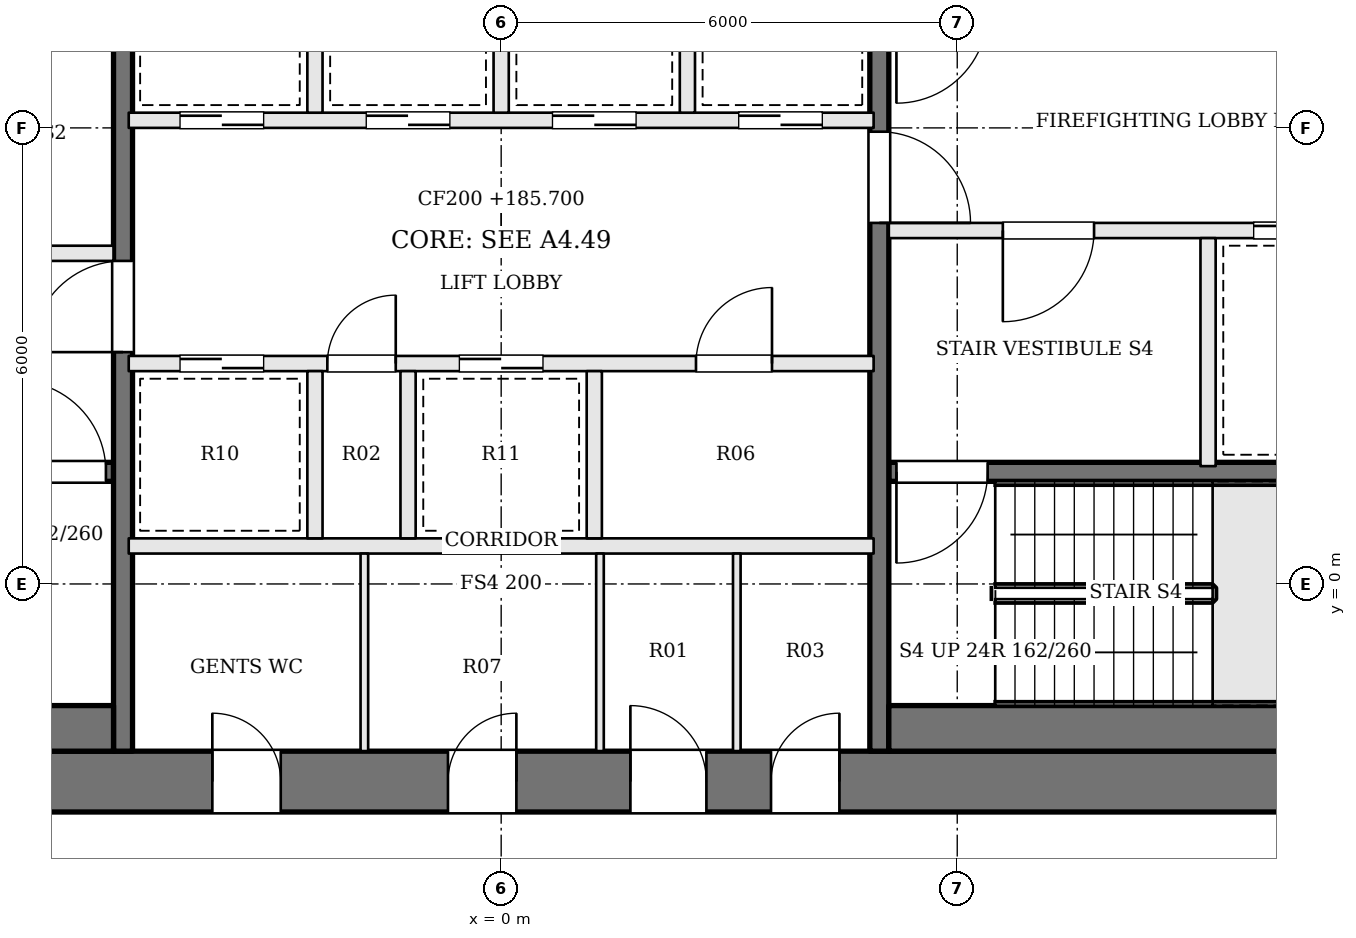
"""IFC4 building model, lengths in metres.
Left out: names, types, materials, properties, quantities, classifications, styles, units other than length and angle.
Written with IfcOpenShell. Run it as: python <this file> out.ifc"""

import sys

from ifc_helpers import new_model, si_unit, direction, frame, frame_2d, origin, place, context, subcontext, project, spatial, rectangle, extrude, element, fill, save


model = new_model("IFC4")
c1 = context("Model", 3, precision=1e-05, world=origin(), true_north=direction((0.0, 1.0)))
c2 = subcontext(c1, "Body", "Model", "MODEL_VIEW")
j1 = project(units=[si_unit("LENGTHUNIT", "METRE"), si_unit("PLANEANGLEUNIT", "RADIAN")], contexts=[c1])
p1 = place(None, origin())
s1 = spatial("IfcSite", under=j1, at=p1, CompositionType="ELEMENT")
p2 = place(p1, origin())
s2 = spatial("IfcBuilding", under=s1, at=p2, CompositionType="ELEMENT")
p3 = place(p2, frame((0.0, 0.0, 185.7)))
s3 = spatial("IfcBuildingStorey", under=s2, at=p3, CompositionType="ELEMENT", Elevation=185.7)
p4 = place(p3, frame((-13.0, -2.6, 0.0), z_axis=(0.0, 0.0, 1.0), x_axis=(1.0, 0.0, 0.0)))
e1 = element("IfcWall", 1, at=p4, inside=s3, PredefinedType="SHEAR", context=c2, shape_type="SweptSolid", body=[
    extrude(rectangle(XDim=26.0, YDim=0.8, at=frame_2d((13.0, 0.0))), origin(), (0.0, 0.0, 1.0), 3.9),
])
p5 = place(p4, frame((9.2, 0.0, 0.0)))
e2 = element("IfcOpeningElement", 2, at=p5, cuts=e1, PredefinedType="OPENING", context=c2, shape_type="SweptSolid", body=[
    extrude(rectangle(XDim=0.9, YDim=2.1, at=frame_2d((0.45, 1.05))), frame((0.0, 0.41, 0.0), z_axis=(0.0, -1.0, 0.0), x_axis=(1.0, 0.0, 0.0)), (0.0, 0.0, 1.0), 0.82),
])
p6 = place(p4, frame((12.3, 0.0, 0.0)))
e3 = element("IfcOpeningElement", 3, at=p6, cuts=e1, PredefinedType="OPENING", context=c2, shape_type="SweptSolid", body=[
    extrude(rectangle(XDim=0.9, YDim=2.1, at=frame_2d((0.45, 1.05))), frame((0.0, 0.41, 0.0), z_axis=(0.0, -1.0, 0.0), x_axis=(1.0, 0.0, 0.0)), (0.0, 0.0, 1.0), 0.82),
])
p7 = place(p4, frame((14.7, 0.0, 0.0)))
e4 = element("IfcOpeningElement", 4, at=p7, cuts=e1, PredefinedType="OPENING", context=c2, shape_type="SweptSolid", body=[
    extrude(rectangle(XDim=1.0, YDim=2.1, at=frame_2d((0.5, 1.05))), frame((0.0, 0.41, 0.0), z_axis=(0.0, -1.0, 0.0), x_axis=(1.0, 0.0, 0.0)), (0.0, 0.0, 1.0), 0.82),
])
p8 = place(p4, frame((16.55, 0.0, 0.0)))
e5 = element("IfcOpeningElement", 5, at=p8, cuts=e1, PredefinedType="OPENING", context=c2, shape_type="SweptSolid", body=[
    extrude(rectangle(XDim=0.9, YDim=2.1, at=frame_2d((0.45, 1.05))), frame((0.0, 0.41, 0.0), z_axis=(0.0, -1.0, 0.0), x_axis=(1.0, 0.0, 0.0)), (0.0, 0.0, 1.0), 0.82),
])
p9 = place(p3, frame((-12.2, 1.475, 0.0), z_axis=(0.0, 0.0, 1.0), x_axis=(1.0, 0.0, 0.0)))
e6 = element("IfcWall", 6, at=p9, inside=s3, PredefinedType="SOLIDWALL", context=c2, shape_type="SweptSolid", body=[
    extrude(rectangle(XDim=7.1, YDim=0.25, at=frame_2d((3.55, 0.0))), origin(), (0.0, 0.0, 1.0), 3.7),
])
p10 = place(p9, frame((5.8, 0.0, 0.0)))
e7 = element("IfcOpeningElement", 7, at=p10, cuts=e6, PredefinedType="OPENING", context=c2, shape_type="SweptSolid", body=[
    extrude(rectangle(XDim=1.2, YDim=2.1, at=frame_2d((0.6, 1.05))), frame((0.0, 0.135, 0.0), z_axis=(0.0, -1.0, 0.0), x_axis=(1.0, 0.0, 0.0)), (0.0, 0.0, 1.0), 0.27),
])
p11 = place(p3, frame((-12.2, 4.35, 0.0), z_axis=(0.0, 0.0, 1.0), x_axis=(1.0, 0.0, 0.0)))
e8 = element("IfcWall", 8, at=p11, inside=s3, PredefinedType="SOLIDWALL", context=c2, shape_type="SweptSolid", body=[
    extrude(rectangle(XDim=7.1, YDim=0.2, at=frame_2d((3.55, 0.0))), origin(), (0.0, 0.0, 1.0), 3.7),
])
p12 = place(p11, frame((4.4, 0.0, 0.0)))
e9 = element("IfcOpeningElement", 9, at=p12, cuts=e8, PredefinedType="OPENING", context=c2, shape_type="SweptSolid", body=[
    extrude(rectangle(XDim=1.2, YDim=2.1, at=frame_2d((0.6, 1.05))), frame((0.0, 0.11, 0.0), z_axis=(0.0, -1.0, 0.0), x_axis=(1.0, 0.0, 0.0)), (0.0, 0.0, 1.0), 0.22),
])
p13 = place(p11, frame((1.1, 0.0, 0.0)))
e10 = element("IfcOpeningElement", 10, at=p13, cuts=e8, PredefinedType="OPENING", context=c2, shape_type="SweptSolid", body=[
    extrude(rectangle(XDim=1.2, YDim=2.1, at=frame_2d((0.6, 1.05))), frame((0.0, 0.11, 0.0), z_axis=(0.0, -1.0, 0.0), x_axis=(1.0, 0.0, 0.0)), (0.0, 0.0, 1.0), 0.22),
])
p14 = place(p3, frame((12.2, 4.65, 0.0), z_axis=(0.0, 0.0, 1.0), x_axis=(-1.0, 0.0, 0.0)))
e11 = element("IfcWall", 11, at=p14, inside=s3, PredefinedType="SOLIDWALL", context=c2, shape_type="SweptSolid", body=[
    extrude(rectangle(XDim=7.1, YDim=0.2, at=frame_2d((3.55, 0.0))), origin(), (0.0, 0.0, 1.0), 3.7),
])
p15 = place(p14, frame((4.4, 0.0, 0.0)))
e12 = element("IfcOpeningElement", 12, at=p15, cuts=e11, PredefinedType="OPENING", context=c2, shape_type="SweptSolid", body=[
    extrude(rectangle(XDim=1.2, YDim=2.1, at=frame_2d((0.6, 1.05))), frame((0.0, 0.11, 0.0), z_axis=(0.0, -1.0, 0.0), x_axis=(1.0, 0.0, 0.0)), (0.0, 0.0, 1.0), 0.22),
])
p16 = place(p14, frame((1.1, 0.0, 0.0)))
e13 = element("IfcOpeningElement", 13, at=p16, cuts=e11, PredefinedType="OPENING", context=c2, shape_type="SweptSolid", body=[
    extrude(rectangle(XDim=1.2, YDim=2.1, at=frame_2d((0.6, 1.05))), frame((0.0, 0.11, 0.0), z_axis=(0.0, -1.0, 0.0), x_axis=(1.0, 0.0, 0.0)), (0.0, 0.0, 1.0), 0.22),
])
p17 = place(p3, frame((12.2, 1.475, 0.0), z_axis=(0.0, 0.0, 1.0), x_axis=(-1.0, 0.0, 0.0)))
e14 = element("IfcWall", 14, at=p17, inside=s3, PredefinedType="SOLIDWALL", context=c2, shape_type="SweptSolid", body=[
    extrude(rectangle(XDim=7.1, YDim=0.25, at=frame_2d((3.55, 0.0))), origin(), (0.0, 0.0, 1.0), 3.7),
])
p18 = place(p17, frame((5.8, 0.0, 0.0)))
e15 = element("IfcOpeningElement", 15, at=p18, cuts=e14, PredefinedType="OPENING", context=c2, shape_type="SweptSolid", body=[
    extrude(rectangle(XDim=1.2, YDim=2.1, at=frame_2d((0.6, 1.05))), frame((0.0, 0.135, 0.0), z_axis=(0.0, -1.0, 0.0), x_axis=(1.0, 0.0, 0.0)), (0.0, 0.0, 1.0), 0.27),
])
p19 = place(p3, frame((9.3, 4.55, 0.0), z_axis=(0.0, 0.0, 1.0), x_axis=(0.0, -1.0, 0.0)))
e16 = element("IfcWall", 16, at=p19, inside=s3, PredefinedType="SOLIDWALL", context=c2, shape_type="SweptSolid", body=[
    extrude(rectangle(XDim=3.0, YDim=0.2, at=frame_2d((1.5, 0.0))), origin(), (0.0, 0.0, 1.0), 3.7),
])
p20 = place(p3, frame((-4.975, -2.2, 0.0), z_axis=(0.0, 0.0, 1.0), x_axis=(0.0, 1.0, 0.0)))
e17 = element("IfcWall", 17, at=p20, inside=s3, PredefinedType="SOLIDWALL", context=c2, shape_type="SweptSolid", body=[
    extrude(rectangle(XDim=13.4, YDim=0.25, at=frame_2d((6.7, 0.0))), origin(), (0.0, 0.0, 1.0), 3.7),
])
p21 = place(p20, frame((5.25, 0.0, 0.0)))
e18 = element("IfcOpeningElement", 18, at=p21, cuts=e17, PredefinedType="OPENING", context=c2, shape_type="SweptSolid", body=[
    extrude(rectangle(XDim=1.2, YDim=2.1, at=frame_2d((0.6, 1.05))), frame((0.0, 0.135, 0.0), z_axis=(0.0, -1.0, 0.0), x_axis=(1.0, 0.0, 0.0)), (0.0, 0.0, 1.0), 0.27),
])
p22 = place(p3, frame((4.975, 11.2, 0.0), z_axis=(0.0, 0.0, 1.0), x_axis=(0.0, -1.0, 0.0)))
e19 = element("IfcWall", 19, at=p22, inside=s3, PredefinedType="SOLIDWALL", context=c2, shape_type="SweptSolid", body=[
    extrude(rectangle(XDim=13.4, YDim=0.25, at=frame_2d((6.7, 0.0))), origin(), (0.0, 0.0, 1.0), 3.7),
])
p23 = place(p22, frame((5.25, 0.0, 0.0)))
e20 = element("IfcOpeningElement", 20, at=p23, cuts=e19, PredefinedType="OPENING", context=c2, shape_type="SweptSolid", body=[
    extrude(rectangle(XDim=1.2, YDim=2.1, at=frame_2d((0.6, 1.05))), frame((0.0, 0.135, 0.0), z_axis=(0.0, -1.0, 0.0), x_axis=(1.0, 0.0, 0.0)), (0.0, 0.0, 1.0), 0.27),
])
for number, where, z_axis, x_axis in (
    (21, (-12.2, -1.9, 0.0), (0.0, 0.0, 1.0), (1.0, 0.0, 0.0)),
    (22, (12.2, -1.9, 0.0), (0.0, 0.0, 1.0), (-1.0, 0.0, 0.0)),
):
    element("IfcWall", number, at=place(p3, frame(where, z_axis=z_axis, x_axis=x_axis)), inside=s3, PredefinedType="SOLIDWALL", context=c2, shape_type="SweptSolid", body=[
        extrude(rectangle(XDim=7.1, YDim=0.6, at=frame_2d((3.55, 0.0))), origin(), (0.0, 0.0, 1.0), 3.7),
    ])
p24 = place(p3, frame((-4.9, 0.5, 0.0), z_axis=(0.0, 0.0, 1.0), x_axis=(1.0, 0.0, 0.0)))
e23 = element("IfcWall", 23, at=p24, inside=s3, PredefinedType="SOLIDWALL", context=c2, shape_type="SweptSolid", body=[
    extrude(rectangle(XDim=9.8, YDim=0.2, at=frame_2d((4.9, 0.0))), origin(), (0.0, 0.0, 1.0), 3.7),
])
p25 = place(p3, frame((-4.9, 2.9, 0.0), z_axis=(0.0, 0.0, 1.0), x_axis=(1.0, 0.0, 0.0)))
e24 = element("IfcWall", 24, at=p25, inside=s3, PredefinedType="SOLIDWALL", context=c2, shape_type="SweptSolid", body=[
    extrude(rectangle(XDim=9.8, YDim=0.2, at=frame_2d((4.9, 0.0))), origin(), (0.0, 0.0, 1.0), 3.7),
])
p26 = place(p25, frame((0.675, 0.0, 0.0)))
e25 = element("IfcOpeningElement", 25, at=p26, cuts=e24, PredefinedType="OPENING", context=c2, shape_type="SweptSolid", body=[
    extrude(rectangle(XDim=1.1, YDim=2.1, at=frame_2d((0.55, 1.05))), frame((0.0, 0.11, 0.0), z_axis=(0.0, -1.0, 0.0), x_axis=(1.0, 0.0, 0.0)), (0.0, 0.0, 1.0), 0.22),
])
p27 = place(p25, frame((2.613, 0.0, 0.0)))
e26 = element("IfcOpeningElement", 26, at=p27, cuts=e24, PredefinedType="OPENING", context=c2, shape_type="SweptSolid", body=[
    extrude(rectangle(XDim=0.9, YDim=2.1, at=frame_2d((0.45, 1.05))), frame((0.0, 0.11, 0.0), z_axis=(0.0, -1.0, 0.0), x_axis=(1.0, 0.0, 0.0)), (0.0, 0.0, 1.0), 0.22),
])
p28 = place(p25, frame((4.35, 0.0, 0.0)))
e27 = element("IfcOpeningElement", 27, at=p28, cuts=e24, PredefinedType="OPENING", context=c2, shape_type="SweptSolid", body=[
    extrude(rectangle(XDim=1.1, YDim=2.1, at=frame_2d((0.55, 1.05))), frame((0.0, 0.11, 0.0), z_axis=(0.0, -1.0, 0.0), x_axis=(1.0, 0.0, 0.0)), (0.0, 0.0, 1.0), 0.22),
])
p29 = place(p25, frame((7.463, 0.0, 0.0)))
e28 = element("IfcOpeningElement", 28, at=p29, cuts=e24, PredefinedType="OPENING", context=c2, shape_type="SweptSolid", body=[
    extrude(rectangle(XDim=1.0, YDim=2.1, at=frame_2d((0.5, 1.05))), frame((0.0, 0.11, 0.0), z_axis=(0.0, -1.0, 0.0), x_axis=(1.0, 0.0, 0.0)), (0.0, 0.0, 1.0), 0.22),
])
p30 = place(p3, frame((-4.9, 6.1, 0.0), z_axis=(0.0, 0.0, 1.0), x_axis=(1.0, 0.0, 0.0)))
e29 = element("IfcWall", 29, at=p30, inside=s3, PredefinedType="SOLIDWALL", context=c2, shape_type="SweptSolid", body=[
    extrude(rectangle(XDim=9.8, YDim=0.2, at=frame_2d((4.9, 0.0))), origin(), (0.0, 0.0, 1.0), 3.7),
])
p31 = place(p30, frame((0.675, 0.0, 0.0)))
e30 = element("IfcOpeningElement", 30, at=p31, cuts=e29, PredefinedType="OPENING", context=c2, shape_type="SweptSolid", body=[
    extrude(rectangle(XDim=1.1, YDim=2.1, at=frame_2d((0.55, 1.05))), frame((0.0, 0.11, 0.0), z_axis=(0.0, -1.0, 0.0), x_axis=(1.0, 0.0, 0.0)), (0.0, 0.0, 1.0), 0.22),
])
p32 = place(p30, frame((3.125, 0.0, 0.0)))
e31 = element("IfcOpeningElement", 31, at=p32, cuts=e29, PredefinedType="OPENING", context=c2, shape_type="SweptSolid", body=[
    extrude(rectangle(XDim=1.1, YDim=2.1, at=frame_2d((0.55, 1.05))), frame((0.0, 0.11, 0.0), z_axis=(0.0, -1.0, 0.0), x_axis=(1.0, 0.0, 0.0)), (0.0, 0.0, 1.0), 0.22),
])
p33 = place(p30, frame((5.575, 0.0, 0.0)))
e32 = element("IfcOpeningElement", 32, at=p33, cuts=e29, PredefinedType="OPENING", context=c2, shape_type="SweptSolid", body=[
    extrude(rectangle(XDim=1.1, YDim=2.1, at=frame_2d((0.55, 1.05))), frame((0.0, 0.11, 0.0), z_axis=(0.0, -1.0, 0.0), x_axis=(1.0, 0.0, 0.0)), (0.0, 0.0, 1.0), 0.22),
])
p34 = place(p30, frame((8.025, 0.0, 0.0)))
e33 = element("IfcOpeningElement", 33, at=p34, cuts=e29, PredefinedType="OPENING", context=c2, shape_type="SweptSolid", body=[
    extrude(rectangle(XDim=1.1, YDim=2.1, at=frame_2d((0.55, 1.05))), frame((0.0, 0.11, 0.0), z_axis=(0.0, -1.0, 0.0), x_axis=(1.0, 0.0, 0.0)), (0.0, 0.0, 1.0), 0.22),
])
for number, where, z_axis, x_axis in (
    (34, (-2.45, 0.6, 0.0), (0.0, 0.0, 1.0), (0.0, 1.0, 0.0)),
    (35, (-1.225, 0.6, 0.0), (0.0, 0.0, 1.0), (0.0, 1.0, 0.0)),
    (36, (1.225, 0.6, 0.0), (0.0, 0.0, 1.0), (0.0, 1.0, 0.0)),
    (37, (-2.45, 6.2, 0.0), (0.0, 0.0, 1.0), (0.0, 1.0, 0.0)),
    (38, (0.0, 6.2, 0.0), (0.0, 0.0, 1.0), (0.0, 1.0, 0.0)),
    (39, (2.45, 6.2, 0.0), (0.0, 0.0, 1.0), (0.0, 1.0, 0.0)),
):
    element("IfcWall", number, at=place(p3, frame(where, z_axis=z_axis, x_axis=x_axis)), inside=s3, PredefinedType="SOLIDWALL", context=c2, shape_type="SweptSolid", body=[
        extrude(rectangle(XDim=2.2, YDim=0.2, at=frame_2d((1.1, 0.0))), origin(), (0.0, 0.0, 1.0), 3.7),
    ])
for number, where, z_axis, x_axis in (
    (40, (-1.8, -2.2, 0.0), (0.0, 0.0, 1.0), (0.0, 1.0, 0.0)),
    (41, (1.3, -2.2, 0.0), (0.0, 0.0, 1.0), (0.0, 1.0, 0.0)),
    (42, (3.1, -2.2, 0.0), (0.0, 0.0, 1.0), (0.0, 1.0, 0.0)),
):
    element("IfcWall", number, at=place(p3, frame(where, z_axis=z_axis, x_axis=x_axis)), inside=s3, PredefinedType="PARTITIONING", context=c2, shape_type="SweptSolid", body=[
        extrude(rectangle(XDim=2.6, YDim=0.1, at=frame_2d((1.3, 0.0))), origin(), (0.0, 0.0, 1.0), 3.7),
    ])
p35 = place(p21, origin())
e43 = element("IfcDoor", 43, at=p35, inside=s3, OperationType="SINGLE_SWING_LEFT", PredefinedType="DOOR", context=c2, shape_type="SweptSolid", body=[
    extrude(rectangle(XDim=1.2, YDim=2.1, at=frame_2d((0.6, 1.05))), frame((0.0, 0.025, 0.0), z_axis=(0.0, -1.0, 0.0), x_axis=(1.0, 0.0, 0.0)), (0.0, 0.0, 1.0), 0.05),
])
fill(e18, e43)
p36 = place(p23, origin())
e44 = element("IfcDoor", 44, at=p36, inside=s3, OperationType="SINGLE_SWING_RIGHT", PredefinedType="DOOR", context=c2, shape_type="SweptSolid", body=[
    extrude(rectangle(XDim=1.2, YDim=2.1, at=frame_2d((0.6, 1.05))), frame((0.0, 0.025, 0.0), z_axis=(0.0, -1.0, 0.0), x_axis=(1.0, 0.0, 0.0)), (0.0, 0.0, 1.0), 0.05),
])
fill(e20, e44)
p37 = place(p15, origin())
e45 = element("IfcDoor", 45, at=p37, inside=s3, OperationType="SINGLE_SWING_RIGHT", PredefinedType="DOOR", context=c2, shape_type="SweptSolid", body=[
    extrude(rectangle(XDim=1.2, YDim=2.1, at=frame_2d((0.6, 1.05))), frame((0.0, 0.025, 0.0), z_axis=(0.0, -1.0, 0.0), x_axis=(1.0, 0.0, 0.0)), (0.0, 0.0, 1.0), 0.05),
])
fill(e12, e45)
p38 = place(p10, origin())
e46 = element("IfcDoor", 46, at=p38, inside=s3, OperationType="SINGLE_SWING_LEFT", PredefinedType="DOOR", context=c2, shape_type="SweptSolid", body=[
    extrude(rectangle(XDim=1.2, YDim=2.1, at=frame_2d((0.6, 1.05))), frame((0.0, 0.025, 0.0), z_axis=(0.0, -1.0, 0.0), x_axis=(1.0, 0.0, 0.0)), (0.0, 0.0, 1.0), 0.05),
])
fill(e7, e46)
p39 = place(p18, origin())
e47 = element("IfcDoor", 47, at=p39, inside=s3, OperationType="SINGLE_SWING_RIGHT", PredefinedType="DOOR", context=c2, shape_type="SweptSolid", body=[
    extrude(rectangle(XDim=1.2, YDim=2.1, at=frame_2d((0.6, 1.05))), frame((0.0, 0.025, 0.0), z_axis=(0.0, -1.0, 0.0), x_axis=(1.0, 0.0, 0.0)), (0.0, 0.0, 1.0), 0.05),
])
fill(e15, e47)
p40 = place(p16, origin())
e48 = element("IfcDoor", 48, at=p40, inside=s3, OperationType="SLIDING_TO_RIGHT", PredefinedType="DOOR", context=c2, shape_type="SweptSolid", body=[
    extrude(rectangle(XDim=1.2, YDim=2.1, at=frame_2d((0.6, 1.05))), frame((0.0, 0.025, 0.0), z_axis=(0.0, -1.0, 0.0), x_axis=(1.0, 0.0, 0.0)), (0.0, 0.0, 1.0), 0.05),
])
fill(e13, e48)
p41 = place(p26, origin())
e49 = element("IfcDoor", 49, at=p41, inside=s3, OperationType="SLIDING_TO_RIGHT", PredefinedType="DOOR", context=c2, shape_type="SweptSolid", body=[
    extrude(rectangle(XDim=1.1, YDim=2.1, at=frame_2d((0.55, 1.05))), frame((0.0, 0.025, 0.0), z_axis=(0.0, -1.0, 0.0), x_axis=(1.0, 0.0, 0.0)), (0.0, 0.0, 1.0), 0.05),
])
fill(e25, e49)
p42 = place(p27, origin())
e50 = element("IfcDoor", 50, at=p42, inside=s3, OperationType="SINGLE_SWING_RIGHT", PredefinedType="DOOR", context=c2, shape_type="SweptSolid", body=[
    extrude(rectangle(XDim=0.9, YDim=2.1, at=frame_2d((0.45, 1.05))), frame((0.0, 0.025, 0.0), z_axis=(0.0, -1.0, 0.0), x_axis=(1.0, 0.0, 0.0)), (0.0, 0.0, 1.0), 0.05),
])
fill(e26, e50)
p43 = place(p28, origin())
e51 = element("IfcDoor", 51, at=p43, inside=s3, OperationType="SLIDING_TO_LEFT", PredefinedType="DOOR", context=c2, shape_type="SweptSolid", body=[
    extrude(rectangle(XDim=1.1, YDim=2.1, at=frame_2d((0.55, 1.05))), frame((0.0, 0.025, 0.0), z_axis=(0.0, -1.0, 0.0), x_axis=(1.0, 0.0, 0.0)), (0.0, 0.0, 1.0), 0.05),
])
fill(e27, e51)
p44 = place(p29, origin())
e52 = element("IfcDoor", 52, at=p44, inside=s3, OperationType="SINGLE_SWING_RIGHT", PredefinedType="DOOR", context=c2, shape_type="SweptSolid", body=[
    extrude(rectangle(XDim=1.0, YDim=2.1, at=frame_2d((0.5, 1.05))), frame((0.0, 0.025, 0.0), z_axis=(0.0, -1.0, 0.0), x_axis=(1.0, 0.0, 0.0)), (0.0, 0.0, 1.0), 0.05),
])
fill(e28, e52)
p45 = place(p31, origin())
e53 = element("IfcDoor", 53, at=p45, inside=s3, OperationType="SLIDING_TO_RIGHT", PredefinedType="DOOR", context=c2, shape_type="SweptSolid", body=[
    extrude(rectangle(XDim=1.1, YDim=2.1, at=frame_2d((0.55, 1.05))), frame((0.0, 0.025, 0.0), z_axis=(0.0, -1.0, 0.0), x_axis=(1.0, 0.0, 0.0)), (0.0, 0.0, 1.0), 0.05),
])
fill(e30, e53)
p46 = place(p32, origin())
e54 = element("IfcDoor", 54, at=p46, inside=s3, OperationType="SLIDING_TO_LEFT", PredefinedType="DOOR", context=c2, shape_type="SweptSolid", body=[
    extrude(rectangle(XDim=1.1, YDim=2.1, at=frame_2d((0.55, 1.05))), frame((0.0, 0.025, 0.0), z_axis=(0.0, -1.0, 0.0), x_axis=(1.0, 0.0, 0.0)), (0.0, 0.0, 1.0), 0.05),
])
fill(e31, e54)
p47 = place(p33, origin())
e55 = element("IfcDoor", 55, at=p47, inside=s3, OperationType="SLIDING_TO_RIGHT", PredefinedType="DOOR", context=c2, shape_type="SweptSolid", body=[
    extrude(rectangle(XDim=1.1, YDim=2.1, at=frame_2d((0.55, 1.05))), frame((0.0, 0.025, 0.0), z_axis=(0.0, -1.0, 0.0), x_axis=(1.0, 0.0, 0.0)), (0.0, 0.0, 1.0), 0.05),
])
fill(e32, e55)
p48 = place(p34, origin())
e56 = element("IfcDoor", 56, at=p48, inside=s3, OperationType="SLIDING_TO_LEFT", PredefinedType="DOOR", context=c2, shape_type="SweptSolid", body=[
    extrude(rectangle(XDim=1.1, YDim=2.1, at=frame_2d((0.55, 1.05))), frame((0.0, 0.025, 0.0), z_axis=(0.0, -1.0, 0.0), x_axis=(1.0, 0.0, 0.0)), (0.0, 0.0, 1.0), 0.05),
])
fill(e33, e56)
p49 = place(p5, origin())
e57 = element("IfcDoor", 57, at=p49, inside=s3, OperationType="SINGLE_SWING_LEFT", PredefinedType="DOOR", context=c2, shape_type="SweptSolid", body=[
    extrude(rectangle(XDim=0.9, YDim=2.1, at=frame_2d((0.45, 1.05))), frame((0.0, 0.025, 0.0), z_axis=(0.0, -1.0, 0.0), x_axis=(1.0, 0.0, 0.0)), (0.0, 0.0, 1.0), 0.05),
])
fill(e2, e57)
p50 = place(p6, origin())
e58 = element("IfcDoor", 58, at=p50, inside=s3, OperationType="SINGLE_SWING_RIGHT", PredefinedType="DOOR", context=c2, shape_type="SweptSolid", body=[
    extrude(rectangle(XDim=0.9, YDim=2.1, at=frame_2d((0.45, 1.05))), frame((0.0, 0.025, 0.0), z_axis=(0.0, -1.0, 0.0), x_axis=(1.0, 0.0, 0.0)), (0.0, 0.0, 1.0), 0.05),
])
fill(e3, e58)
p51 = place(p7, origin())
e59 = element("IfcDoor", 59, at=p51, inside=s3, OperationType="SINGLE_SWING_LEFT", PredefinedType="DOOR", context=c2, shape_type="SweptSolid", body=[
    extrude(rectangle(XDim=1.0, YDim=2.1, at=frame_2d((0.5, 1.05))), frame((0.0, 0.025, 0.0), z_axis=(0.0, -1.0, 0.0), x_axis=(1.0, 0.0, 0.0)), (0.0, 0.0, 1.0), 0.05),
])
fill(e4, e59)
p52 = place(p8, origin())
e60 = element("IfcDoor", 60, at=p52, inside=s3, OperationType="SINGLE_SWING_RIGHT", PredefinedType="DOOR", context=c2, shape_type="SweptSolid", body=[
    extrude(rectangle(XDim=0.9, YDim=2.1, at=frame_2d((0.45, 1.05))), frame((0.0, 0.025, 0.0), z_axis=(0.0, -1.0, 0.0), x_axis=(1.0, 0.0, 0.0)), (0.0, 0.0, 1.0), 0.05),
])
fill(e5, e60)
save(model, sys.argv[1])
